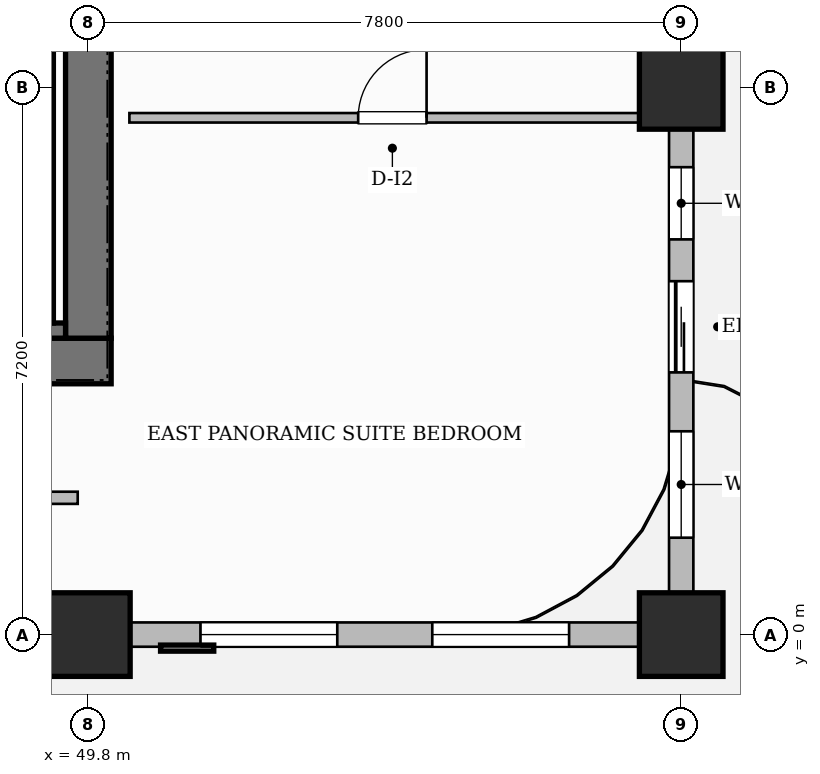
"""IFC4 building model, lengths in metres.
Left out: names, types, materials, properties, quantities, classifications, styles, units other than length and angle.
Written with IfcOpenShell. Run it as: python <this file> out.ifc"""

import sys

from ifc_helpers import new_model, si_unit, direction, frame, frame_2d, origin, origin_2d, place, context, subcontext, project, spatial, rectangle, extrude, source, transform, mapped, element, fill, save


model = new_model("IFC4")
c1 = context("Model", 3, precision=1e-05, world=origin(), true_north=direction((0.0, 1.0)))
c2 = subcontext(c1, "Body", "Model", "MODEL_VIEW")
j1 = project(units=[si_unit("LENGTHUNIT", "METRE"), si_unit("PLANEANGLEUNIT", "RADIAN")], contexts=[c1])
p1 = place(None, origin())
s1 = spatial("IfcSite", under=j1, at=p1, CompositionType="ELEMENT")
p2 = place(p1, origin())
s2 = spatial("IfcBuilding", under=s1, at=p2, CompositionType="ELEMENT")
p3 = place(p2, frame((0.0, 0.0, 62.0)))
s3 = spatial("IfcBuildingStorey", under=s2, at=p3, CompositionType="ELEMENT", Elevation=62.0)
p4 = place(p3, frame((34.5, 3.6, 0.0), z_axis=(0.0, 0.0, 1.0), x_axis=(1.0, 0.0, 0.0)))
e1 = element("IfcWall", 1, at=p4, inside=s3, PredefinedType="SHEAR", context=c2, shape_type="SweptSolid", body=[
    extrude(rectangle(XDim=15.6, YDim=0.6, at=frame_2d((7.8, 0.0))), origin(), (0.0, 0.0, 1.0), 3.7),
])
p5 = place(p4, frame((4.5, 0.0, 0.0)))
e2 = element("IfcOpeningElement", 2, at=p5, cuts=e1, PredefinedType="OPENING", context=c2, shape_type="SweptSolid", body=[
    extrude(rectangle(XDim=0.9, YDim=2.1, at=frame_2d((0.45, 1.05))), frame((0.0, 0.31, 0.0), z_axis=(0.0, -1.0, 0.0), x_axis=(1.0, 0.0, 0.0)), (0.0, 0.0, 1.0), 0.62),
])
p6 = place(p4, frame((6.95, 0.0, 0.0)))
e3 = element("IfcOpeningElement", 3, at=p6, cuts=e1, PredefinedType="OPENING", context=c2, shape_type="SweptSolid", body=[
    extrude(rectangle(XDim=0.9, YDim=2.1, at=frame_2d((0.45, 1.05))), frame((0.0, 0.31, 0.0), z_axis=(0.0, -1.0, 0.0), x_axis=(1.0, 0.0, 0.0)), (0.0, 0.0, 1.0), 0.62),
])
p7 = place(p3, frame((49.8, 3.9, 0.0), z_axis=(0.0, 0.0, 1.0), x_axis=(0.0, 1.0, 0.0)))
e4 = element("IfcWall", 4, at=p7, inside=s3, PredefinedType="SHEAR", context=c2, shape_type="SweptSolid", body=[
    extrude(rectangle(XDim=10.2, YDim=0.6, at=frame_2d((5.1, 0.0))), origin(), (0.0, 0.0, 1.0), 3.7),
])
m1 = source(origin(), c2, "Body", "SweptSolid", [
    extrude(rectangle(XDim=1.1, YDim=1.1, at=origin_2d()), origin(), (0.0, 0.0, 1.0), 3.7),
])
for number, where, z_axis, x_axis in (
    (5, (49.8, 0.0, 0.0), (0.0, 0.0, 1.0), (1.0, 0.0, 0.0)),
    (6, (57.6, 0.0, 0.0), (0.0, 0.0, 1.0), (1.0, 0.0, 0.0)),
    (7, (57.6, 7.2, 0.0), (0.0, 0.0, 1.0), (1.0, 0.0, 0.0)),
):
    element("IfcColumn", number, at=place(p3, frame(where, z_axis=z_axis, x_axis=x_axis)), inside=s3, PredefinedType="COLUMN", context=c2, shape_type="MappedRepresentation", body=[
        mapped(m1, transform((0.0, 0.0, 0.0), scale=1.0)),
    ])
p8 = place(p3, frame((43.12, 4.0, 0.0), z_axis=(0.0, 0.0, 1.0), x_axis=(1.0, 0.0, 0.0)))
e8 = element("IfcWall", 8, at=p8, inside=s3, PredefinedType="SHEAR", context=c2, shape_type="SweptSolid", body=[
    extrude(rectangle(XDim=6.38, YDim=0.2, at=frame_2d((3.19, 0.0))), origin(), (0.0, 0.0, 1.0), 3.7),
])
p9 = place(p3, frame((49.24, 4.1, 0.0), z_axis=(0.0, 0.0, 1.0), x_axis=(0.0, 1.0, 0.0)))
e9 = element("IfcWall", 9, at=p9, inside=s3, PredefinedType="SHEAR", context=c2, shape_type="SweptSolid", body=[
    extrude(rectangle(XDim=6.95, YDim=0.2, at=frame_2d((3.475, 0.0))), origin(), (0.0, 0.0, 1.0), 3.7),
])
p10 = place(p3, frame((30.29, 1.8, 0.0), z_axis=(0.0, 0.0, 1.0), x_axis=(1.0, 0.0, 0.0)))
e10 = element("IfcWall", 10, at=p10, inside=s3, PredefinedType="PARTITIONING", context=c2, shape_type="SweptSolid", body=[
    extrude(rectangle(XDim=19.37, YDim=0.16, at=frame_2d((9.685, 0.0))), origin(), (0.0, 0.0, 1.0), 3.45),
])
p11 = place(p10, frame((9.735, 0.0, 0.0)))
e11 = element("IfcOpeningElement", 11, at=p11, cuts=e10, PredefinedType="OPENING", context=c2, shape_type="SweptSolid", body=[
    extrude(rectangle(XDim=0.95, YDim=2.15, at=frame_2d((0.475, 1.075))), frame((0.0, 0.09, 0.0), z_axis=(0.0, -1.0, 0.0), x_axis=(1.0, 0.0, 0.0)), (0.0, 0.0, 1.0), 0.18),
])
p12 = place(p3, frame((50.34, 6.8, 0.0), z_axis=(0.0, 0.0, 1.0), x_axis=(1.0, 0.0, 0.0)))
e12 = element("IfcWall", 12, at=p12, inside=s3, PredefinedType="PARTITIONING", context=c2, shape_type="SweptSolid", body=[
    extrude(rectangle(XDim=7.07, YDim=0.125, at=frame_2d((3.535, 0.0))), origin(), (0.0, 0.0, 1.0), 3.45),
])
p13 = place(p12, frame((3.01, 0.0, 0.0)))
e13 = element("IfcOpeningElement", 13, at=p13, cuts=e12, PredefinedType="OPENING", context=c2, shape_type="SweptSolid", body=[
    extrude(rectangle(XDim=0.9, YDim=2.15, at=frame_2d((0.45, 1.075))), frame((0.0, 0.073, 0.0), z_axis=(0.0, -1.0, 0.0), x_axis=(1.0, 0.0, 0.0)), (0.0, 0.0, 1.0), 0.145),
])
p14 = place(p3, frame((14.4, 0.0, 0.0), z_axis=(0.0, 0.0, 1.0), x_axis=(1.0, 0.0, 0.0)))
e14 = element("IfcWall", 14, at=p14, inside=s3, PredefinedType="SOLIDWALL", context=c2, shape_type="SweptSolid", body=[
    extrude(rectangle(XDim=43.2, YDim=0.32, at=frame_2d((21.6, 0.0))), origin(), (0.0, 0.0, 1.0), 2.885),
])
p15 = place(p14, frame((1.5, 0.0, 0.0)))
e15 = element("IfcOpeningElement", 15, at=p15, cuts=e14, PredefinedType="OPENING", context=c2, shape_type="SweptSolid", body=[
    extrude(rectangle(XDim=1.2, YDim=2.2, at=frame_2d((0.6, 1.1))), frame((0.0, 0.17, 0.0), z_axis=(0.0, -1.0, 0.0), x_axis=(1.0, 0.0, 0.0)), (0.0, 0.0, 1.0), 0.34),
])
p16 = place(p14, frame((3.336, 0.0, 0.8)))
e16 = element("IfcOpeningElement", 16, at=p16, cuts=e14, PredefinedType="OPENING", context=c2, shape_type="SweptSolid", body=[
    extrude(rectangle(XDim=1.4, YDim=1.85, at=frame_2d((0.7, 0.925))), frame((0.0, 0.17, 0.0), z_axis=(0.0, -1.0, 0.0), x_axis=(1.0, 0.0, 0.0)), (0.0, 0.0, 1.0), 0.34),
])
p17 = place(p14, frame((5.269, 0.0, 0.8)))
e17 = element("IfcOpeningElement", 17, at=p17, cuts=e14, PredefinedType="OPENING", context=c2, shape_type="SweptSolid", body=[
    extrude(rectangle(XDim=0.95, YDim=1.75, at=frame_2d((0.475, 0.875))), frame((0.0, 0.17, 0.0), z_axis=(0.0, -1.0, 0.0), x_axis=(1.0, 0.0, 0.0)), (0.0, 0.0, 1.0), 0.34),
])
p18 = place(p14, frame((8.596, 0.0, 0.8)))
e18 = element("IfcOpeningElement", 18, at=p18, cuts=e14, PredefinedType="OPENING", context=c2, shape_type="SweptSolid", body=[
    extrude(rectangle(XDim=1.8, YDim=1.85, at=frame_2d((0.9, 0.925))), frame((0.0, 0.17, 0.0), z_axis=(0.0, -1.0, 0.0), x_axis=(1.0, 0.0, 0.0)), (0.0, 0.0, 1.0), 0.34),
])
p19 = place(p14, frame((11.404, 0.0, 0.8)))
e19 = element("IfcOpeningElement", 19, at=p19, cuts=e14, PredefinedType="OPENING", context=c2, shape_type="SweptSolid", body=[
    extrude(rectangle(XDim=1.8, YDim=1.85, at=frame_2d((0.9, 0.925))), frame((0.0, 0.17, 0.0), z_axis=(0.0, -1.0, 0.0), x_axis=(1.0, 0.0, 0.0)), (0.0, 0.0, 1.0), 0.34),
])
p20 = place(p14, frame((16.804, 0.0, 0.8)))
e20 = element("IfcOpeningElement", 20, at=p20, cuts=e14, PredefinedType="OPENING", context=c2, shape_type="SweptSolid", body=[
    extrude(rectangle(XDim=1.8, YDim=1.85, at=frame_2d((0.9, 0.925))), frame((0.0, 0.17, 0.0), z_axis=(0.0, -1.0, 0.0), x_axis=(1.0, 0.0, 0.0)), (0.0, 0.0, 1.0), 0.34),
])
p21 = place(p14, frame((21.725, 0.0, 0.8)))
e21 = element("IfcOpeningElement", 21, at=p21, cuts=e14, PredefinedType="OPENING", context=c2, shape_type="SweptSolid", body=[
    extrude(rectangle(XDim=1.8, YDim=1.85, at=frame_2d((0.9, 0.925))), frame((0.0, 0.17, 0.0), z_axis=(0.0, -1.0, 0.0), x_axis=(1.0, 0.0, 0.0)), (0.0, 0.0, 1.0), 0.34),
])
p22 = place(p14, frame((24.475, 0.0, 0.8)))
e22 = element("IfcOpeningElement", 22, at=p22, cuts=e14, PredefinedType="OPENING", context=c2, shape_type="SweptSolid", body=[
    extrude(rectangle(XDim=1.8, YDim=1.85, at=frame_2d((0.9, 0.925))), frame((0.0, 0.17, 0.0), z_axis=(0.0, -1.0, 0.0), x_axis=(1.0, 0.0, 0.0)), (0.0, 0.0, 1.0), 0.34),
])
p23 = place(p14, frame((29.075, 0.0, 0.8)))
e23 = element("IfcOpeningElement", 23, at=p23, cuts=e14, PredefinedType="OPENING", context=c2, shape_type="SweptSolid", body=[
    extrude(rectangle(XDim=1.8, YDim=1.85, at=frame_2d((0.9, 0.925))), frame((0.0, 0.17, 0.0), z_axis=(0.0, -1.0, 0.0), x_axis=(1.0, 0.0, 0.0)), (0.0, 0.0, 1.0), 0.34),
])
p24 = place(p14, frame((32.125, 0.0, 0.8)))
e24 = element("IfcOpeningElement", 24, at=p24, cuts=e14, PredefinedType="OPENING", context=c2, shape_type="SweptSolid", body=[
    extrude(rectangle(XDim=1.8, YDim=1.85, at=frame_2d((0.9, 0.925))), frame((0.0, 0.17, 0.0), z_axis=(0.0, -1.0, 0.0), x_axis=(1.0, 0.0, 0.0)), (0.0, 0.0, 1.0), 0.34),
])
p25 = place(p14, frame((36.875, 0.0, 0.8)))
e25 = element("IfcOpeningElement", 25, at=p25, cuts=e14, PredefinedType="OPENING", context=c2, shape_type="SweptSolid", body=[
    extrude(rectangle(XDim=1.8, YDim=1.85, at=frame_2d((0.9, 0.925))), frame((0.0, 0.17, 0.0), z_axis=(0.0, -1.0, 0.0), x_axis=(1.0, 0.0, 0.0)), (0.0, 0.0, 1.0), 0.34),
])
p26 = place(p14, frame((39.925, 0.0, 0.8)))
e26 = element("IfcOpeningElement", 26, at=p26, cuts=e14, PredefinedType="OPENING", context=c2, shape_type="SweptSolid", body=[
    extrude(rectangle(XDim=1.8, YDim=1.85, at=frame_2d((0.9, 0.925))), frame((0.0, 0.17, 0.0), z_axis=(0.0, -1.0, 0.0), x_axis=(1.0, 0.0, 0.0)), (0.0, 0.0, 1.0), 0.34),
])
p27 = place(p3, frame((57.6, 0.05, 0.0), z_axis=(0.0, 0.0, 1.0), x_axis=(0.0, 1.0, 0.0)))
e27 = element("IfcWall", 27, at=p27, inside=s3, PredefinedType="SOLIDWALL", context=c2, shape_type="SweptSolid", body=[
    extrude(rectangle(XDim=21.5, YDim=0.32, at=frame_2d((10.75, 0.0))), origin(), (0.0, 0.0, 1.0), 2.885),
])
p28 = place(p27, frame((3.4, 0.0, 0.0)))
e28 = element("IfcOpeningElement", 28, at=p28, cuts=e27, PredefinedType="OPENING", context=c2, shape_type="SweptSolid", body=[
    extrude(rectangle(XDim=1.2, YDim=2.2, at=frame_2d((0.6, 1.1))), frame((0.0, 0.17, 0.0), z_axis=(0.0, -1.0, 0.0), x_axis=(1.0, 0.0, 0.0)), (0.0, 0.0, 1.0), 0.34),
])
p29 = place(p27, frame((1.225, 0.0, 0.8)))
e29 = element("IfcOpeningElement", 29, at=p29, cuts=e27, PredefinedType="OPENING", context=c2, shape_type="SweptSolid", body=[
    extrude(rectangle(XDim=1.4, YDim=1.85, at=frame_2d((0.7, 0.925))), frame((0.0, 0.17, 0.0), z_axis=(0.0, -1.0, 0.0), x_axis=(1.0, 0.0, 0.0)), (0.0, 0.0, 1.0), 0.34),
])
p30 = place(p27, frame((5.15, 0.0, 0.8)))
e30 = element("IfcOpeningElement", 30, at=p30, cuts=e27, PredefinedType="OPENING", context=c2, shape_type="SweptSolid", body=[
    extrude(rectangle(XDim=0.95, YDim=1.75, at=frame_2d((0.475, 0.875))), frame((0.0, 0.17, 0.0), z_axis=(0.0, -1.0, 0.0), x_axis=(1.0, 0.0, 0.0)), (0.0, 0.0, 1.0), 0.34),
])
p31 = place(p27, frame((8.475, 0.0, 0.8)))
e31 = element("IfcOpeningElement", 31, at=p31, cuts=e27, PredefinedType="OPENING", context=c2, shape_type="SweptSolid", body=[
    extrude(rectangle(XDim=1.8, YDim=1.85, at=frame_2d((0.9, 0.925))), frame((0.0, 0.17, 0.0), z_axis=(0.0, -1.0, 0.0), x_axis=(1.0, 0.0, 0.0)), (0.0, 0.0, 1.0), 0.34),
])
p32 = place(p27, frame((11.225, 0.0, 0.8)))
e32 = element("IfcOpeningElement", 32, at=p32, cuts=e27, PredefinedType="OPENING", context=c2, shape_type="SweptSolid", body=[
    extrude(rectangle(XDim=1.8, YDim=1.85, at=frame_2d((0.9, 0.925))), frame((0.0, 0.17, 0.0), z_axis=(0.0, -1.0, 0.0), x_axis=(1.0, 0.0, 0.0)), (0.0, 0.0, 1.0), 0.34),
])
p33 = place(p27, frame((17.679, 0.0, 0.8)))
e33 = element("IfcOpeningElement", 33, at=p33, cuts=e27, PredefinedType="OPENING", context=c2, shape_type="SweptSolid", body=[
    extrude(rectangle(XDim=1.8, YDim=1.85, at=frame_2d((0.9, 0.925))), frame((0.0, 0.17, 0.0), z_axis=(0.0, -1.0, 0.0), x_axis=(1.0, 0.0, 0.0)), (0.0, 0.0, 1.0), 0.34),
])
m2 = source(origin(), c2, "Body", "SweptSolid", [
    extrude(rectangle(XDim=0.9, YDim=2.15, at=frame_2d((0.45, 1.075))), frame((0.0, 0.025, 0.0), z_axis=(0.0, -1.0, 0.0), x_axis=(1.0, 0.0, 0.0)), (0.0, 0.0, 1.0), 0.05),
])
p34 = place(p13, origin())
e34 = element("IfcDoor", 34, at=p34, inside=s3, OperationType="SINGLE_SWING_RIGHT", PredefinedType="DOOR", context=c2, shape_type="MappedRepresentation", body=[
    mapped(m2, transform((0.0, 0.0, 0.0), scale=1.0)),
])
fill(e13, e34)
m3 = source(origin(), c2, "Body", "SweptSolid", [
    extrude(rectangle(XDim=1.2, YDim=2.2, at=frame_2d((0.6, 1.1))), frame((0.0, 0.025, 0.0), z_axis=(0.0, -1.0, 0.0), x_axis=(1.0, 0.0, 0.0)), (0.0, 0.0, 1.0), 0.05),
])
p35 = place(p28, origin())
e35 = element("IfcDoor", 35, at=p35, inside=s3, OperationType="SLIDING_TO_LEFT", PredefinedType="DOOR", context=c2, shape_type="MappedRepresentation", body=[
    mapped(m3, transform((0.0, 0.0, 0.0), scale=1.0)),
])
fill(e28, e35)
m4 = source(origin(), c2, "Body", "SweptSolid", [
    extrude(rectangle(XDim=1.8, YDim=1.85, at=frame_2d((0.9, 0.925))), frame((0.0, 0.03, 0.0), z_axis=(0.0, -1.0, 0.0), x_axis=(1.0, 0.0, 0.0)), (0.0, 0.0, 1.0), 0.06),
])
p36 = place(p25, origin())
e36 = element("IfcWindow", 36, at=p36, inside=s3, PartitioningType="DOUBLE_PANEL_VERTICAL", PredefinedType="WINDOW", context=c2, shape_type="MappedRepresentation", body=[
    mapped(m4, transform((0.0, 0.0, 0.0), scale=1.0)),
])
fill(e25, e36)
p37 = place(p26, origin())
e37 = element("IfcWindow", 37, at=p37, inside=s3, PartitioningType="DOUBLE_PANEL_VERTICAL", PredefinedType="WINDOW", context=c2, shape_type="MappedRepresentation", body=[
    mapped(m4, transform((0.0, 0.0, 0.0), scale=1.0)),
])
fill(e26, e37)
m5 = source(origin(), c2, "Body", "SweptSolid", [
    extrude(rectangle(XDim=1.4, YDim=1.85, at=frame_2d((0.7, 0.925))), frame((0.0, 0.03, 0.0), z_axis=(0.0, -1.0, 0.0), x_axis=(1.0, 0.0, 0.0)), (0.0, 0.0, 1.0), 0.06),
])
p38 = place(p29, origin())
e38 = element("IfcWindow", 38, at=p38, inside=s3, PartitioningType="SINGLE_PANEL", PredefinedType="WINDOW", context=c2, shape_type="MappedRepresentation", body=[
    mapped(m5, transform((0.0, 0.0, 0.0), scale=1.0)),
])
fill(e29, e38)
m6 = source(origin(), c2, "Body", "SweptSolid", [
    extrude(rectangle(XDim=0.95, YDim=1.75, at=frame_2d((0.475, 0.875))), frame((0.0, 0.03, 0.0), z_axis=(0.0, -1.0, 0.0), x_axis=(1.0, 0.0, 0.0)), (0.0, 0.0, 1.0), 0.06),
])
p39 = place(p30, origin())
e39 = element("IfcWindow", 39, at=p39, inside=s3, PartitioningType="SINGLE_PANEL", PredefinedType="WINDOW", context=c2, shape_type="MappedRepresentation", body=[
    mapped(m6, transform((0.0, 0.0, 0.0), scale=1.0)),
])
fill(e30, e39)
save(model, sys.argv[1])
